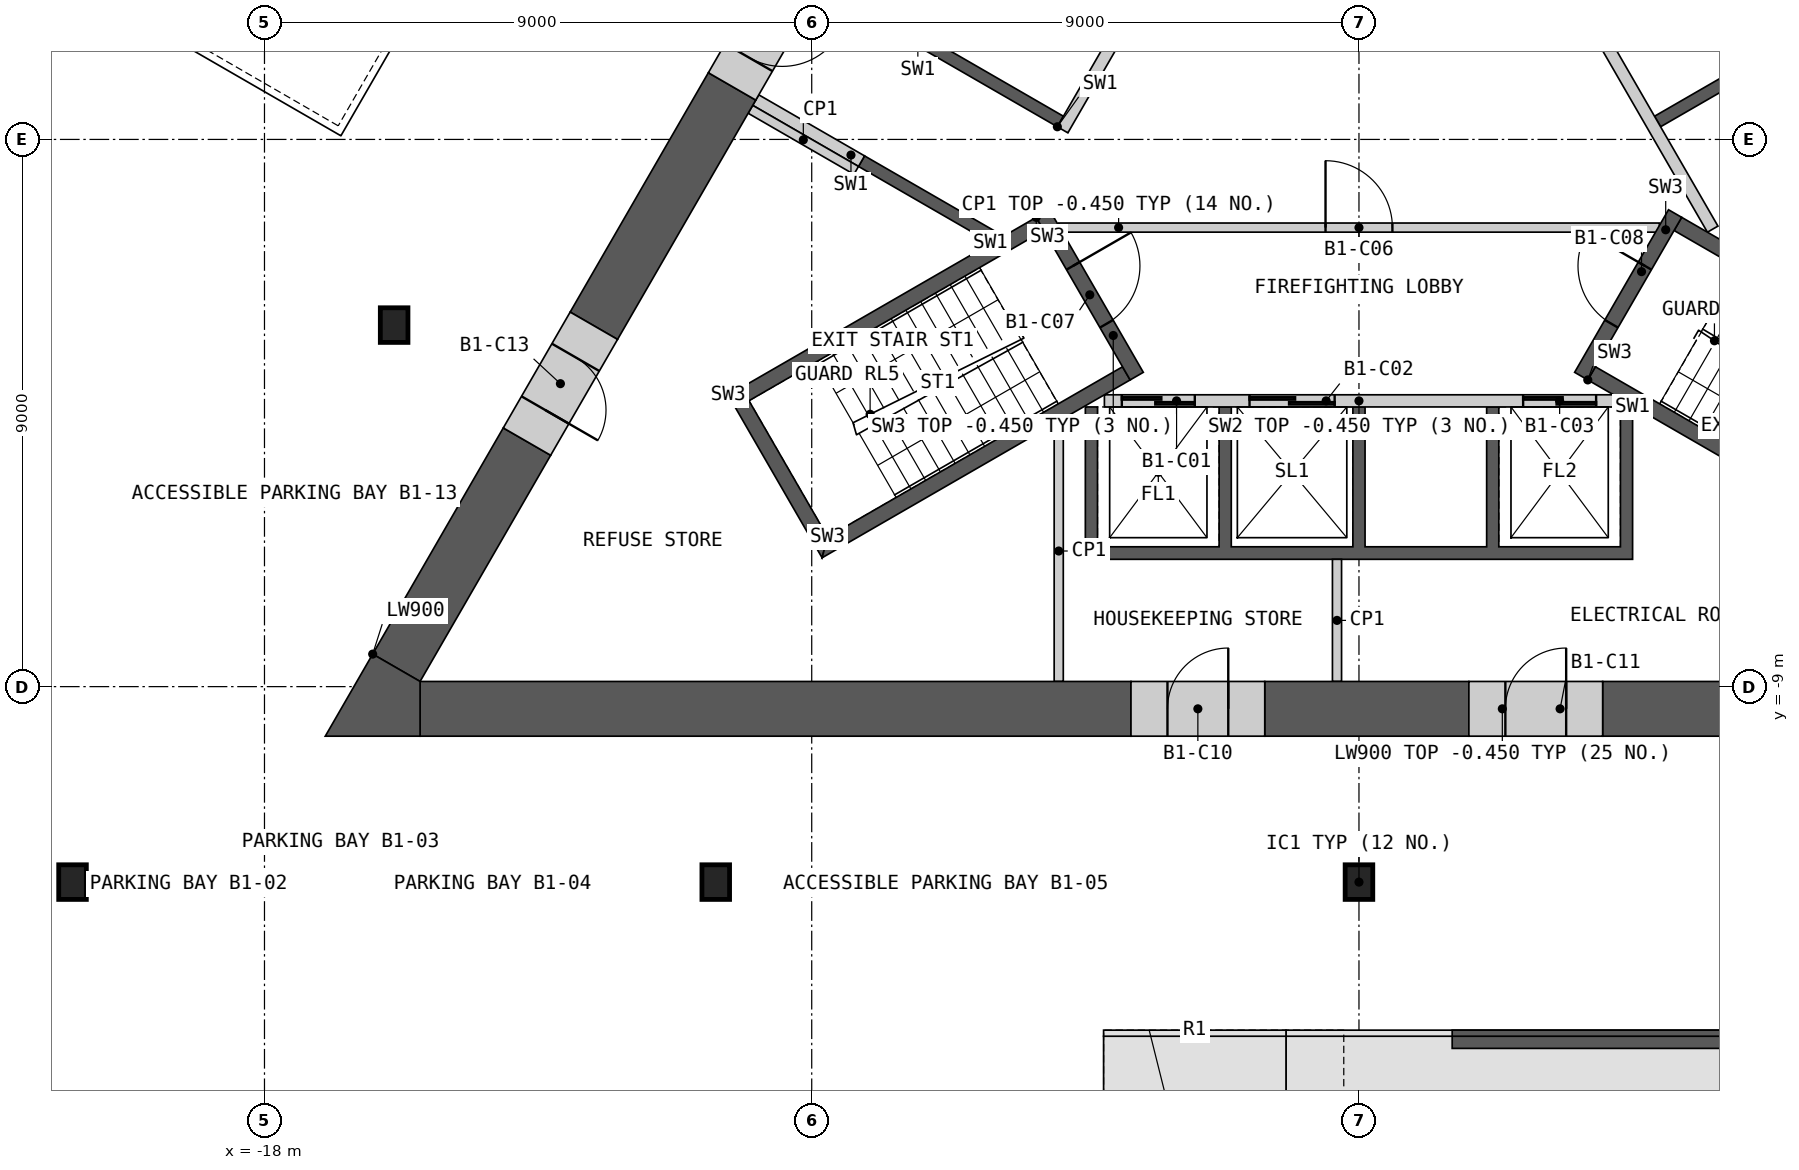
"""IFC4 building model, lengths in metres.
Left out: names, types, materials, properties, quantities, classifications, styles, units other than length and angle.
Written with IfcOpenShell. Run it as: python <this file> out.ifc"""

import sys

from ifc_helpers import new_model, si_unit, direction, frame, frame_2d, origin, origin_2d, place, context, subcontext, project, spatial, polyline, rectangle, i_section, outline, extrude, element, fill, save


model = new_model("IFC4")
c1 = context("Model", 3, precision=1e-05, world=origin(), true_north=direction((0.0, 1.0)))
c2 = subcontext(c1, "Body", "Model", "MODEL_VIEW")
j1 = project(units=[si_unit("LENGTHUNIT", "METRE"), si_unit("PLANEANGLEUNIT", "RADIAN")], contexts=[c1])
p1 = place(None, origin())
s1 = spatial("IfcSite", under=j1, at=p1, CompositionType="ELEMENT")
p2 = place(p1, origin())
s2 = spatial("IfcBuilding", under=s1, at=p2, CompositionType="ELEMENT")
p3 = place(p2, frame((0.0, 0.0, -4.2)))
s3 = spatial("IfcBuildingStorey", under=s2, at=p3, CompositionType="ELEMENT", Elevation=-4.2)
p4 = place(p3, frame((-6.74, 32.759, 0.0), z_axis=(0.0, 0.0, 1.0), x_axis=(-0.500000005698, -0.866025400495, 0.0)))
e1 = element("IfcWall", 1, at=p4, inside=s3, PredefinedType="SOLIDWALL", context=c2, shape_type="SweptSolid", body=[
    extrude(rectangle(XDim=50.0, YDim=0.6, at=frame_2d((25.0, 0.0))), origin(), (0.0, 0.0, 1.0), 3.75),
])
for number, where, z_axis, x_axis in (
    (2, (-15.868, -3.054, 0.0), (0.0, 0.0, 1.0), (1.0, 0.0, 0.0)),
    (3, (-21.157, -12.215, 0.0), (0.0, 0.0, 1.0), (1.0, 0.0, 0.0)),
    (4, (-10.578, -12.215, 0.0), (0.0, 0.0, 1.0), (1.0, 0.0, 0.0)),
    (5, (0.0, -12.215, 0.0), (0.0, 0.0, 1.0), (1.0, 0.0, 0.0)),
):
    element("IfcColumn", number, at=place(p3, frame(where, z_axis=z_axis, x_axis=x_axis)), inside=s3, PredefinedType="COLUMN", context=c2, shape_type="SweptSolid", body=[
        extrude(i_section(OverallWidth=0.454, OverallDepth=0.57, WebThickness=0.078, FlangeThickness=0.125, at=origin_2d()), origin(), (0.0, 0.0, 1.0), 4.2),
    ])
p5 = place(p3, origin())
e6 = element("IfcWall", 6, at=p5, inside=s3, PredefinedType="SHEAR", context=c2, shape_type="SweptSolid", body=[
    extrude(outline(polyline([(4.5, -4.4), (4.5, -6.906), (-4.5, -6.906), (-4.5, -4.4), (-4.3, -4.4), (-4.3, -6.7), (-2.3, -6.7), (-2.3, -4.4), (-2.1, -4.4), (-2.1, -6.7), (-0.1, -6.7), (-0.1, -4.4), (0.1, -4.4), (0.1, -6.7), (2.1, -6.7), (2.1, -4.4), (2.3, -4.4), (2.3, -6.7), (4.3, -6.7), (4.3, -4.4), (4.5, -4.4)])), origin(), (0.0, 0.0, 1.0), 3.75),
])
p6 = place(p3, frame((-4.187, -4.3, 0.0), z_axis=(0.0, 0.0, 1.0), x_axis=(1.0, 0.0, 0.0)))
e7 = element("IfcWall", 7, at=p6, inside=s3, PredefinedType="SOLIDWALL", context=c2, shape_type="SweptSolid", body=[
    extrude(rectangle(XDim=8.373, YDim=0.2, at=frame_2d((4.187, 0.0))), origin(), (0.0, 0.0, 1.0), 3.75),
])
p7 = place(p6, frame((0.287, 0.0, 0.0)))
e8 = element("IfcOpeningElement", 8, at=p7, cuts=e7, PredefinedType="OPENING", context=c2, shape_type="SweptSolid", body=[
    extrude(rectangle(XDim=1.2, YDim=2.1, at=frame_2d((0.6, 1.05))), frame((0.0, 0.11, 0.0), z_axis=(0.0, -1.0, 0.0), x_axis=(1.0, 0.0, 0.0)), (0.0, 0.0, 1.0), 0.22),
])
p8 = place(p6, frame((2.387, 0.0, 0.0)))
e9 = element("IfcOpeningElement", 9, at=p8, cuts=e7, PredefinedType="OPENING", context=c2, shape_type="SweptSolid", body=[
    extrude(rectangle(XDim=1.4, YDim=2.1, at=frame_2d((0.7, 1.05))), frame((0.0, 0.11, 0.0), z_axis=(0.0, -1.0, 0.0), x_axis=(1.0, 0.0, 0.0)), (0.0, 0.0, 1.0), 0.22),
])
p9 = place(p6, frame((6.887, 0.0, 0.0)))
e10 = element("IfcOpeningElement", 10, at=p9, cuts=e7, PredefinedType="OPENING", context=c2, shape_type="SweptSolid", body=[
    extrude(rectangle(XDim=1.2, YDim=2.1, at=frame_2d((0.6, 1.05))), frame((0.0, 0.11, 0.0), z_axis=(0.0, -1.0, 0.0), x_axis=(1.0, 0.0, 0.0)), (0.0, 0.0, 1.0), 0.22),
])
p10 = place(p3, origin())
e11 = element("IfcWall", 11, at=p10, inside=s3, PredefinedType="SHEAR", context=c2, shape_type="SweptSolid", body=[
    extrude(outline(polyline([(2.66, 4.192), (4.831, 5.445), (8.231, -0.444), (6.061, -1.697), (5.96, -1.524), (7.952, -0.374), (6.952, 1.358), (4.96, 0.208), (4.861, 0.381), (6.852, 1.531), (5.852, 3.263), (3.861, 2.113), (3.76, 2.287), (5.752, 3.437), (4.752, 5.169), (2.76, 4.019), (2.66, 4.192)])), origin(), (0.0, 0.0, 1.0), 3.75),
])
p11 = place(p3, frame((5.817, -1.476, 0.0), z_axis=(0.0, 0.0, 1.0), x_axis=(-0.500002616675, 0.866023893041, 0.0)))
e12 = element("IfcWall", 12, at=p11, inside=s3, PredefinedType="SOLIDWALL", context=c2, shape_type="SweptSolid", body=[
    extrude(rectangle(XDim=8.373, YDim=0.2, at=frame_2d((4.187, 0.0))), origin(), (0.0, 0.0, 1.0), 3.75),
])
p12 = place(p11, frame((7.037, 0.0, 0.0)))
e13 = element("IfcOpeningElement", 13, at=p12, cuts=e12, PredefinedType="OPENING", context=c2, shape_type="SweptSolid", body=[
    extrude(rectangle(XDim=0.9, YDim=2.1, at=frame_2d((0.45, 1.05))), frame((0.0, 0.11, 0.0), z_axis=(0.0, -1.0, 0.0), x_axis=(1.0, 0.0, 0.0)), (0.0, 0.0, 1.0), 0.22),
])
p13 = place(p3, origin())
e14 = element("IfcWall", 14, at=p13, inside=s3, PredefinedType="SHEAR", context=c2, shape_type="SweptSolid", body=[
    extrude(outline(polyline([(-6.061, -1.697), (-8.231, -0.444), (-8.131, -0.271), (-5.96, -1.524), (-6.061, -1.697)])), origin(), (0.0, 0.0, 1.0), 3.75),
])
p14 = place(p3, origin())
e15 = element("IfcWall", 15, at=p14, inside=s3, PredefinedType="SHEAR", context=c2, shape_type="SweptSolid", body=[
    extrude(outline(polyline([(-4.96, 0.208), (-7.131, 1.461), (-3.731, 7.35), (-1.561, 6.097), (-1.66, 5.924), (-3.652, 7.074), (-5.752, 3.437), (-3.76, 2.287), (-3.861, 2.113), (-5.852, 3.263), (-6.852, 1.531), (-4.861, 0.381), (-4.96, 0.208)])), origin(), (0.0, 0.0, 1.0), 3.75),
])
p15 = place(p3, frame((-1.631, 5.776, 0.0), z_axis=(0.0, 0.0, 1.0), x_axis=(-0.499992876559, -0.866029516466, 0.0)))
e16 = element("IfcWall", 16, at=p15, inside=s3, PredefinedType="SOLIDWALL", context=c2, shape_type="SweptSolid", body=[
    extrude(rectangle(XDim=6.486, YDim=0.2, at=frame_2d((3.243, 0.0))), origin(), (0.0, 0.0, 1.0), 3.75),
])
p16 = place(p15, frame((1.537, 0.0, 0.0)))
e17 = element("IfcOpeningElement", 17, at=p16, cuts=e16, PredefinedType="OPENING", context=c2, shape_type="SweptSolid", body=[
    extrude(rectangle(XDim=0.9, YDim=2.1, at=frame_2d((0.45, 1.05))), frame((0.0, 0.11, 0.0), z_axis=(0.0, -1.0, 0.0), x_axis=(1.0, 0.0, 0.0)), (0.0, 0.0, 1.0), 0.22),
])
p17 = place(p3, frame((-8.181, -0.357, 0.0), z_axis=(0.0, 0.0, 1.0), x_axis=(-0.866035824272, 0.499981950752, 0.0)))
e18 = element("IfcWall", 18, at=p17, inside=s3, PredefinedType="SHEAR", context=c2, shape_type="SweptSolid", body=[
    extrude(rectangle(XDim=2.009, YDim=0.2, at=frame_2d((1.004, 0.0))), origin(), (0.0, 0.0, 1.0), 3.75),
])
p18 = place(p3, frame((-4.941, -1.45, 0.0), z_axis=(0.0, 0.0, 1.0), x_axis=(1.0, 0.0, 0.0)))
e19 = element("IfcWall", 19, at=p18, inside=s3, PredefinedType="PARTITIONING", context=c2, shape_type="SweptSolid", body=[
    extrude(rectangle(XDim=9.882, YDim=0.15, at=frame_2d((4.941, 0.0))), origin(), (0.0, 0.0, 1.0), 3.75),
])
p19 = place(p18, frame((4.391, 0.0, 0.0)))
e20 = element("IfcOpeningElement", 20, at=p19, cuts=e19, PredefinedType="OPENING", context=c2, shape_type="SweptSolid", body=[
    extrude(rectangle(XDim=1.1, YDim=2.1, at=frame_2d((0.55, 1.05))), frame((0.0, 0.085, 0.0), z_axis=(0.0, -1.0, 0.0), x_axis=(1.0, 0.0, 0.0)), (0.0, 0.0, 1.0), 0.17),
])
p20 = place(p3, origin())
e21 = element("IfcWall", 21, at=p20, inside=s3, PredefinedType="SHEAR", context=c2, shape_type="SweptSolid", body=[
    extrude(outline(polyline([(-5.307, -1.281), (-10.374, -4.206), (-10.032, -4.298), (-5.182, -1.498), (-5.307, -1.281)])), origin(), (0.0, 0.0, 1.0), 3.75),
])
p21 = place(p3, origin())
e22 = element("IfcWall", 22, at=p21, inside=s3, PredefinedType="SHEAR", context=c2, shape_type="SweptSolid", body=[
    extrude(outline(polyline([(-10.374, -4.206), (-8.83, -6.881), (-8.738, -6.539), (-10.032, -4.298), (-10.374, -4.206)])), origin(), (0.0, 0.0, 1.0), 3.75),
])
p22 = place(p3, origin())
e23 = element("IfcWall", 23, at=p22, inside=s3, PredefinedType="SHEAR", context=c2, shape_type="SweptSolid", body=[
    extrude(outline(polyline([(-8.738, -6.539), (-8.83, -6.881), (-3.763, -3.956), (-3.888, -3.739), (-8.738, -6.539)])), origin(), (0.0, 0.0, 1.0), 3.75),
])
p23 = place(p3, frame((-5.199, -1.219, 0.0), z_axis=(0.0, 0.0, 1.0), x_axis=(0.499982516597, -0.866035497597, 0.0)))
e24 = element("IfcWall", 24, at=p23, inside=s3, PredefinedType="SHEAR", context=c2, shape_type="SweptSolid", body=[
    extrude(rectangle(XDim=3.088, YDim=0.25, at=frame_2d((1.544, 0.0))), origin(), (0.0, 0.0, 1.0), 3.75),
])
p24 = place(p23, frame((0.994, 0.0, 0.0)))
e25 = element("IfcOpeningElement", 25, at=p24, cuts=e24, PredefinedType="OPENING", context=c2, shape_type="SweptSolid", body=[
    extrude(rectangle(XDim=1.1, YDim=2.1, at=frame_2d((0.55, 1.05))), frame((0.0, 0.135, 0.0), z_axis=(0.0, -1.0, 0.0), x_axis=(1.0, 0.0, 0.0)), (0.0, 0.0, 1.0), 0.27),
])
p25 = place(p3, origin())
e26 = element("IfcWall", 26, at=p25, inside=s3, PredefinedType="SHEAR", context=c2, shape_type="SweptSolid", body=[
    extrude(outline(polyline([(3.763, -3.956), (8.83, -6.881), (8.738, -6.539), (3.888, -3.739), (3.763, -3.956)])), origin(), (0.0, 0.0, 1.0), 3.75),
])
p26 = place(p3, origin())
e27 = element("IfcWall", 27, at=p26, inside=s3, PredefinedType="SHEAR", context=c2, shape_type="SweptSolid", body=[
    extrude(outline(polyline([(10.032, -4.298), (10.374, -4.206), (5.307, -1.281), (5.182, -1.498), (10.032, -4.298)])), origin(), (0.0, 0.0, 1.0), 3.75),
])
p27 = place(p3, frame((3.655, -3.893, 0.0), z_axis=(0.0, 0.0, 1.0), x_axis=(0.499982516597, 0.866035497597, 0.0)))
e28 = element("IfcWall", 28, at=p27, inside=s3, PredefinedType="SHEAR", context=c2, shape_type="SweptSolid", body=[
    extrude(rectangle(XDim=3.088, YDim=0.25, at=frame_2d((1.544, 0.0))), origin(), (0.0, 0.0, 1.0), 3.75),
])
p28 = place(p27, frame((0.994, 0.0, 0.0)))
e29 = element("IfcOpeningElement", 29, at=p28, cuts=e28, PredefinedType="OPENING", context=c2, shape_type="SweptSolid", body=[
    extrude(rectangle(XDim=1.1, YDim=2.1, at=frame_2d((0.55, 1.05))), frame((0.0, 0.135, 0.0), z_axis=(0.0, -1.0, 0.0), x_axis=(1.0, 0.0, 0.0)), (0.0, 0.0, 1.0), 0.27),
])
p29 = place(p3, frame((-8.268, -0.509, 0.0), z_axis=(0.0, 0.0, 1.0), x_axis=(-0.866035824272, 0.499981950752, 0.0)))
e30 = element("IfcWall", 30, at=p29, inside=s3, PredefinedType="PARTITIONING", context=c2, shape_type="SweptSolid", body=[
    extrude(rectangle(XDim=2.009, YDim=0.15, at=frame_2d((1.004, 0.0))), origin(), (0.0, 0.0, 1.0), 3.75),
])
p30 = place(p3, frame((-0.361, -8.915, 0.0), z_axis=(0.0, 0.0, 1.0), x_axis=(0.0, 1.0, 0.0)))
e31 = element("IfcWall", 31, at=p30, inside=s3, PredefinedType="PARTITIONING", context=c2, shape_type="SweptSolid", body=[
    extrude(rectangle(XDim=2.009, YDim=0.15, at=frame_2d((1.004, 0.0))), origin(), (0.0, 0.0, 1.0), 3.75),
])
p31 = place(p3, frame((-4.938, -8.915, 0.0), z_axis=(0.0, 0.0, 1.0), x_axis=(0.0, 1.0, 0.0)))
e32 = element("IfcWall", 32, at=p31, inside=s3, PredefinedType="PARTITIONING", context=c2, shape_type="SweptSolid", body=[
    extrude(rectangle(XDim=4.291, YDim=0.15, at=frame_2d((2.146, 0.0))), origin(), (0.0, 0.0, 1.0), 3.75),
])
p32 = place(p3, frame((-15.441, -9.365, 0.0), z_axis=(0.0, 0.0, 1.0), x_axis=(1.0, 0.0, 0.0)))
e33 = element("IfcWall", 33, at=p32, inside=s3, PredefinedType="SHEAR", context=c2, shape_type="SweptSolid", body=[
    extrude(rectangle(XDim=11.692, YDim=0.9, at=frame_2d((5.846, 0.0))), origin(), (0.0, 0.0, 1.0), 3.75),
])
p33 = place(p3, frame((4.008, -9.365, 0.0), z_axis=(0.0, 0.0, 1.0), x_axis=(1.0, 0.0, 0.0)))
e34 = element("IfcWall", 34, at=p33, inside=s3, PredefinedType="SHEAR", context=c2, shape_type="SweptSolid", body=[
    extrude(rectangle(XDim=5.739, YDim=0.9, at=frame_2d((2.869, 0.0))), origin(), (0.0, 0.0, 1.0), 3.75),
])
p34 = place(p3, frame((-1.55, -9.365, 0.0), z_axis=(0.0, 0.0, 1.0), x_axis=(1.0, 0.0, 0.0)))
e35 = element("IfcWall", 35, at=p34, inside=s3, PredefinedType="SHEAR", context=c2, shape_type="SweptSolid", body=[
    extrude(rectangle(XDim=3.357, YDim=0.9, at=frame_2d((1.679, 0.0))), origin(), (0.0, 0.0, 1.0), 3.75),
])
p35 = place(p3, frame((-10.31, 0.872, 0.0), z_axis=(0.0, 0.0, 1.0), x_axis=(-0.499968858743, -0.866043382451, 0.0)))
e36 = element("IfcWall", 36, at=p35, inside=s3, PredefinedType="SHEAR", context=c2, shape_type="SweptSolid", body=[
    extrude(rectangle(XDim=4.546, YDim=0.9, at=frame_2d((2.273, 0.0))), origin(), (0.0, 0.0, 1.0), 3.75),
])
p36 = place(p3, frame((-13.683, -4.97, 0.0), z_axis=(0.0, 0.0, 1.0), x_axis=(-0.499996331799, -0.866027521611, 0.0)))
e37 = element("IfcWall", 37, at=p36, inside=s3, PredefinedType="SHEAR", context=c2, shape_type="SweptSolid", body=[
    extrude(rectangle(XDim=4.295, YDim=0.9, at=frame_2d((2.148, 0.0))), origin(), (0.0, 0.0, 1.0), 3.75),
])
p37 = place(p3, origin())
e38 = element("IfcWall", 38, at=p37, inside=s3, PredefinedType="SHEAR", context=c2, shape_type="SweptSolid", body=[
    extrude(outline(polyline([(-16.221, -8.465), (-15.441, -8.915), (-15.441, -9.815), (-17.0, -9.815), (-16.221, -8.465)])), origin(), (0.0, 0.0, 1.0), 3.75),
])
p38 = place(p3, frame((-3.75, -9.365, 0.0), z_axis=(0.0, 0.0, 1.0), x_axis=(1.0, 0.0, 0.0)))
e39 = element("IfcWall", 39, at=p38, inside=s3, PredefinedType="SHEAR", context=c2, shape_type="SweptSolid", body=[
    extrude(rectangle(XDim=2.2, YDim=0.9, at=frame_2d((1.1, 0.0))), origin(), (0.0, 0.0, 1.0), 3.75),
])
p39 = place(p38, frame((0.6, 0.0, 0.0)))
e40 = element("IfcOpeningElement", 40, at=p39, cuts=e39, PredefinedType="OPENING", context=c2, shape_type="SweptSolid", body=[
    extrude(rectangle(XDim=1.0, YDim=2.1, at=frame_2d((0.5, 1.05))), frame((0.0, 0.46, 0.0), z_axis=(0.0, -1.0, 0.0), x_axis=(1.0, 0.0, 0.0)), (0.0, 0.0, 1.0), 0.92),
])
p40 = place(p3, frame((1.808, -9.365, 0.0), z_axis=(0.0, 0.0, 1.0), x_axis=(1.0, 0.0, 0.0)))
e41 = element("IfcWall", 41, at=p40, inside=s3, PredefinedType="SHEAR", context=c2, shape_type="SweptSolid", body=[
    extrude(rectangle(XDim=2.2, YDim=0.9, at=frame_2d((1.1, 0.0))), origin(), (0.0, 0.0, 1.0), 3.75),
])
p41 = place(p40, frame((0.6, 0.0, 0.0)))
e42 = element("IfcOpeningElement", 42, at=p41, cuts=e41, PredefinedType="OPENING", context=c2, shape_type="SweptSolid", body=[
    extrude(rectangle(XDim=1.0, YDim=2.1, at=frame_2d((0.5, 1.05))), frame((0.0, 0.46, 0.0), z_axis=(0.0, -1.0, 0.0), x_axis=(1.0, 0.0, 0.0)), (0.0, 0.0, 1.0), 0.92),
])
p42 = place(p3, frame((-12.583, -3.065, 0.0), z_axis=(0.0, 0.0, 1.0), x_axis=(-0.50002983664, -0.866008176907, 0.0)))
e43 = element("IfcWall", 43, at=p42, inside=s3, PredefinedType="SHEAR", context=c2, shape_type="SweptSolid", body=[
    extrude(rectangle(XDim=2.2, YDim=0.9, at=frame_2d((1.1, 0.0))), origin(), (0.0, 0.0, 1.0), 3.75),
])
p43 = place(p42, frame((0.6, 0.0, 0.0)))
e44 = element("IfcOpeningElement", 44, at=p43, cuts=e43, PredefinedType="OPENING", context=c2, shape_type="SweptSolid", body=[
    extrude(rectangle(XDim=1.0, YDim=2.1, at=frame_2d((0.5, 1.05))), frame((0.0, 0.46, 0.0), z_axis=(0.0, -1.0, 0.0), x_axis=(1.0, 0.0, 0.0)), (0.0, 0.0, 1.0), 0.92),
])
p44 = place(p3, frame((-9.21, 2.777, 0.0), z_axis=(0.0, 0.0, 1.0), x_axis=(-0.500077893725, -0.86598042715, 0.0)))
e45 = element("IfcWall", 45, at=p44, inside=s3, PredefinedType="SHEAR", context=c2, shape_type="SweptSolid", body=[
    extrude(rectangle(XDim=2.2, YDim=0.9, at=frame_2d((1.1, 0.0))), origin(), (0.0, 0.0, 1.0), 3.75),
])
p45 = place(p44, frame((0.55, 0.0, 0.0)))
e46 = element("IfcOpeningElement", 46, at=p45, cuts=e45, PredefinedType="OPENING", context=c2, shape_type="SweptSolid", body=[
    extrude(rectangle(XDim=1.1, YDim=2.1, at=frame_2d((0.55, 1.05))), frame((0.0, 0.46, 0.0), z_axis=(0.0, -1.0, 0.0), x_axis=(1.0, 0.0, 0.0)), (0.0, 0.0, 1.0), 0.92),
])
p46 = place(p3, frame((24.0, -14.8, 0.0), z_axis=(0.0, 0.0, 1.0), x_axis=(-1.0, 0.0, 0.0)))
e47 = element("IfcWall", 47, at=p46, inside=s3, PredefinedType="SHEAR", context=c2, shape_type="SweptSolid", body=[
    extrude(outline(polyline([(0.0, 0.0), (22.467, 0.0), (22.467, 0.3), (3.0, 3.549), (3.0, 3.544), (0.0, 3.799), (0.0, 0.0)])), frame((0.0, 0.15, 0.0), z_axis=(0.0, -1.0, 0.0), x_axis=(1.0, 0.0, 0.0)), (0.0, 0.0, 1.0), 0.3),
])
p47 = place(p7, origin())
e48 = element("IfcDoor", 48, at=p47, inside=s3, OperationType="SLIDING_TO_LEFT", PredefinedType="DOOR", context=c2, shape_type="SweptSolid", body=[
    extrude(rectangle(XDim=1.2, YDim=2.1, at=frame_2d((0.6, 1.05))), frame((0.0, 0.025, 0.0), z_axis=(0.0, -1.0, 0.0), x_axis=(1.0, 0.0, 0.0)), (0.0, 0.0, 1.0), 0.05),
])
fill(e8, e48)
p48 = place(p8, origin())
e49 = element("IfcDoor", 49, at=p48, inside=s3, OperationType="SLIDING_TO_LEFT", PredefinedType="DOOR", context=c2, shape_type="SweptSolid", body=[
    extrude(rectangle(XDim=1.4, YDim=2.1, at=frame_2d((0.7, 1.05))), frame((0.0, 0.025, 0.0), z_axis=(0.0, -1.0, 0.0), x_axis=(1.0, 0.0, 0.0)), (0.0, 0.0, 1.0), 0.05),
])
fill(e9, e49)
p49 = place(p9, origin())
e50 = element("IfcDoor", 50, at=p49, inside=s3, OperationType="SLIDING_TO_LEFT", PredefinedType="DOOR", context=c2, shape_type="SweptSolid", body=[
    extrude(rectangle(XDim=1.2, YDim=2.1, at=frame_2d((0.6, 1.05))), frame((0.0, 0.025, 0.0), z_axis=(0.0, -1.0, 0.0), x_axis=(1.0, 0.0, 0.0)), (0.0, 0.0, 1.0), 0.05),
])
fill(e10, e50)
p50 = place(p19, origin())
e51 = element("IfcDoor", 51, at=p50, inside=s3, OperationType="SINGLE_SWING_LEFT", PredefinedType="DOOR", context=c2, shape_type="SweptSolid", body=[
    extrude(rectangle(XDim=1.1, YDim=2.1, at=frame_2d((0.55, 1.05))), frame((0.0, 0.025, 0.0), z_axis=(0.0, -1.0, 0.0), x_axis=(1.0, 0.0, 0.0)), (0.0, 0.0, 1.0), 0.05),
])
fill(e20, e51)
p51 = place(p24, origin())
e52 = element("IfcDoor", 52, at=p51, inside=s3, OperationType="SINGLE_SWING_LEFT", PredefinedType="DOOR", context=c2, shape_type="SweptSolid", body=[
    extrude(rectangle(XDim=1.1, YDim=2.1, at=frame_2d((0.55, 1.05))), frame((0.0, 0.025, 0.0), z_axis=(0.0, -1.0, 0.0), x_axis=(1.0, 0.0, 0.0)), (0.0, 0.0, 1.0), 0.05),
])
fill(e25, e52)
p52 = place(p28, origin())
e53 = element("IfcDoor", 53, at=p52, inside=s3, OperationType="SINGLE_SWING_RIGHT", PredefinedType="DOOR", context=c2, shape_type="SweptSolid", body=[
    extrude(rectangle(XDim=1.1, YDim=2.1, at=frame_2d((0.55, 1.05))), frame((0.0, 0.025, 0.0), z_axis=(0.0, -1.0, 0.0), x_axis=(1.0, 0.0, 0.0)), (0.0, 0.0, 1.0), 0.05),
])
fill(e29, e53)
p53 = place(p39, origin())
e54 = element("IfcDoor", 54, at=p53, inside=s3, OperationType="SINGLE_SWING_RIGHT", PredefinedType="DOOR", context=c2, shape_type="SweptSolid", body=[
    extrude(rectangle(XDim=1.0, YDim=2.1, at=frame_2d((0.5, 1.05))), frame((0.0, 0.205, 0.0), z_axis=(0.0, -1.0, 0.0), x_axis=(1.0, 0.0, 0.0)), (0.0, 0.0, 1.0), 0.05),
])
fill(e40, e54)
p54 = place(p41, origin())
e55 = element("IfcDoor", 55, at=p54, inside=s3, OperationType="SINGLE_SWING_RIGHT", PredefinedType="DOOR", context=c2, shape_type="SweptSolid", body=[
    extrude(rectangle(XDim=1.0, YDim=2.1, at=frame_2d((0.5, 1.05))), frame((0.0, 0.205, 0.0), z_axis=(0.0, -1.0, 0.0), x_axis=(1.0, 0.0, 0.0)), (0.0, 0.0, 1.0), 0.05),
])
fill(e42, e55)
p55 = place(p43, origin())
e56 = element("IfcDoor", 56, at=p55, inside=s3, OperationType="SINGLE_SWING_RIGHT", PredefinedType="DOOR", context=c2, shape_type="SweptSolid", body=[
    extrude(rectangle(XDim=1.0, YDim=2.1, at=frame_2d((0.5, 1.05))), frame((0.0, 0.205, 0.0), z_axis=(0.0, -1.0, 0.0), x_axis=(1.0, 0.0, 0.0)), (0.0, 0.0, 1.0), 0.05),
])
fill(e44, e56)
p56 = place(p45, origin())
e57 = element("IfcDoor", 57, at=p56, inside=s3, OperationType="SINGLE_SWING_LEFT", PredefinedType="DOOR", context=c2, shape_type="SweptSolid", body=[
    extrude(rectangle(XDim=1.1, YDim=2.1, at=frame_2d((0.55, 1.05))), frame((0.0, 0.205, 0.0), z_axis=(0.0, -1.0, 0.0), x_axis=(1.0, 0.0, 0.0)), (0.0, 0.0, 1.0), 0.05),
])
fill(e46, e57)
save(model, sys.argv[1])
